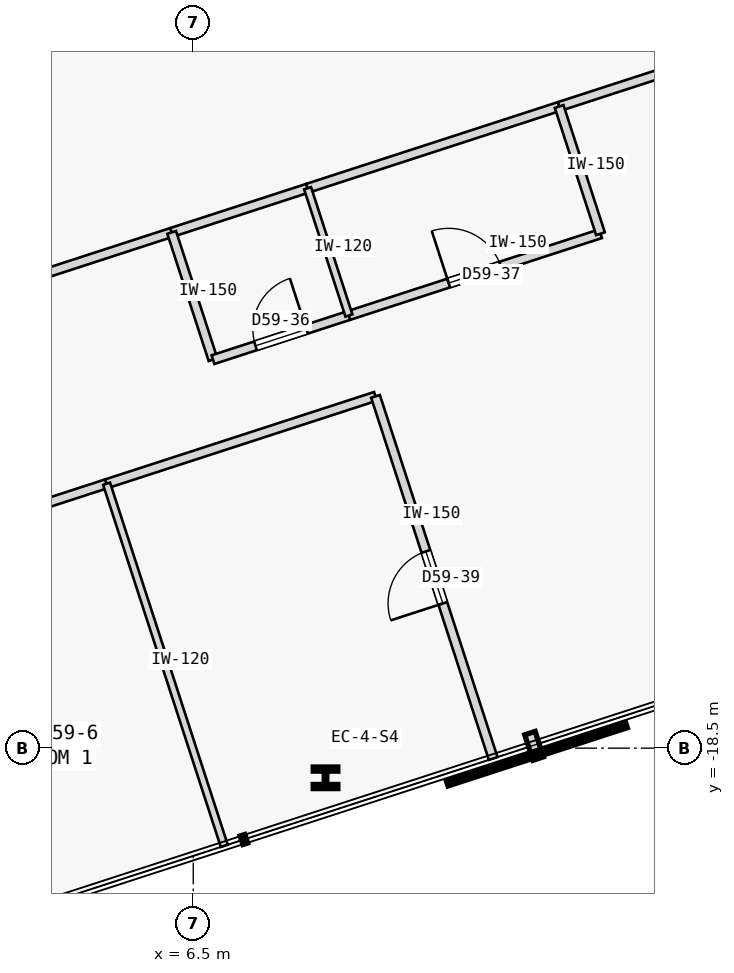
"""IFC4 building model, lengths in metres.
Left out: names, types, materials, properties, quantities, classifications, styles, units other than length and angle.
Written with IfcOpenShell. Run it as: python <this file> out.ifc"""

import sys

from ifc_helpers import new_model, si_unit, direction, frame, frame_2d, origin, origin_2d, place, context, subcontext, project, spatial, rectangle, i_section, extrude, element, fill, save


model = new_model("IFC4")
c1 = context("Model", 3, precision=1e-05, world=origin(), true_north=direction((0.0, 1.0)))
c2 = subcontext(c1, "Body", "Model", "MODEL_VIEW")
j1 = project(units=[si_unit("LENGTHUNIT", "METRE"), si_unit("PLANEANGLEUNIT", "RADIAN")], contexts=[c1])
p1 = place(None, origin())
s1 = spatial("IfcSite", under=j1, at=p1, CompositionType="ELEMENT")
p2 = place(p1, origin())
s2 = spatial("IfcBuilding", under=s1, at=p2, CompositionType="ELEMENT")
p3 = place(p2, frame((0.0, 0.0, 224.3)))
s3 = spatial("IfcBuildingStorey", under=s2, at=p3, CompositionType="ELEMENT", Elevation=224.3)
p4 = place(p3, frame((8.675, -18.988, 0.0), z_axis=(0.0, 0.0, 1.0), x_axis=(1.0, 0.0, 0.0)))
e1 = element("IfcColumn", 1, at=p4, inside=s3, PredefinedType="COLUMN", context=c2, shape_type="SweptSolid", body=[
    extrude(i_section(OverallWidth=0.405, OverallDepth=0.355, WebThickness=0.042, FlangeThickness=0.068, FilletRadius=0.015, at=origin_2d()), origin(), (0.0, 0.0, 1.0), 3.35),
])
p5 = place(p3, frame((-0.555, -12.195, 0.0), z_axis=(0.0, 0.0, 1.0), x_axis=(0.951057495482, 0.309013980732, 0.0)))
e2 = element("IfcWall", 2, at=p5, inside=s3, PredefinedType="PARTITIONING", context=c2, shape_type="SweptSolid", body=[
    extrude(rectangle(XDim=7.045, YDim=0.15, at=frame_2d((3.522, 0.0))), origin(), (0.0, 0.0, 1.0), 3.125),
])
p6 = place(p3, frame((12.517, -7.948, 0.0), z_axis=(0.0, 0.0, 1.0), x_axis=(0.951053764264, 0.309025464128, 0.0)))
e3 = element("IfcWall", 3, at=p6, inside=s3, PredefinedType="PARTITIONING", context=c2, shape_type="SweptSolid", body=[
    extrude(rectangle(XDim=18.399, YDim=0.15, at=frame_2d((9.2, 0.0))), origin(), (0.0, 0.0, 1.0), 3.125),
])
p7 = place(p6, frame((8.725, 0.0, 0.0)))
e4 = element("IfcOpeningElement", 4, at=p7, cuts=e3, PredefinedType="OPENING", context=c2, shape_type="SweptSolid", body=[
    extrude(rectangle(XDim=0.95, YDim=2.15, at=frame_2d((0.475, 1.075))), frame((0.0, 0.085, 0.0), z_axis=(0.0, -1.0, 0.0), x_axis=(1.0, 0.0, 0.0)), (0.0, 0.0, 1.0), 0.17),
])
p8 = place(p3, frame((6.145, -10.018, 0.0), z_axis=(0.0, 0.0, 1.0), x_axis=(0.951035595692, 0.309081373955, 0.0)))
e5 = element("IfcWall", 5, at=p8, inside=s3, PredefinedType="PARTITIONING", context=c2, shape_type="SweptSolid", body=[
    extrude(rectangle(XDim=2.35, YDim=0.15, at=frame_2d((1.175, 0.0))), origin(), (0.0, 0.0, 1.0), 3.125),
])
p9 = place(p3, frame((8.38, -9.292, 0.0), z_axis=(0.0, 0.0, 1.0), x_axis=(0.951074479912, 0.30896170258, 0.0)))
e6 = element("IfcWall", 6, at=p9, inside=s3, PredefinedType="PARTITIONING", context=c2, shape_type="SweptSolid", body=[
    extrude(rectangle(XDim=4.35, YDim=0.15, at=frame_2d((2.175, 0.0))), origin(), (0.0, 0.0, 1.0), 3.125),
])
p10 = place(p3, frame((6.825, -12.111, 0.0), z_axis=(0.0, 0.0, 1.0), x_axis=(-0.308960600764, 0.951074837842, 0.0)))
e7 = element("IfcWall", 7, at=p10, inside=s3, PredefinedType="PARTITIONING", context=c2, shape_type="SweptSolid", body=[
    extrude(rectangle(XDim=2.2, YDim=0.15, at=frame_2d((1.1, 0.0))), origin(), (0.0, 0.0, 1.0), 3.125),
])
p11 = place(p3, frame((6.825, -12.111, 0.0), z_axis=(0.0, 0.0, 1.0), x_axis=(0.951076048914, 0.308956872689, 0.0)))
e8 = element("IfcWall", 8, at=p11, inside=s3, PredefinedType="PARTITIONING", context=c2, shape_type="SweptSolid", body=[
    extrude(rectangle(XDim=2.35, YDim=0.15, at=frame_2d((1.175, 0.0))), origin(), (0.0, 0.0, 1.0), 3.125),
])
p12 = place(p11, frame((0.735, 0.0, 0.0)))
e9 = element("IfcOpeningElement", 9, at=p12, cuts=e8, PredefinedType="OPENING", context=c2, shape_type="SweptSolid", body=[
    extrude(rectangle(XDim=0.88, YDim=2.15, at=frame_2d((0.44, 1.075))), frame((0.0, 0.085, 0.0), z_axis=(0.0, -1.0, 0.0), x_axis=(1.0, 0.0, 0.0)), (0.0, 0.0, 1.0), 0.17),
])
p13 = place(p3, frame((9.06, -11.385, 0.0), z_axis=(0.0, 0.0, 1.0), x_axis=(0.951057987102, 0.309012467661, 0.0)))
e10 = element("IfcWall", 10, at=p13, inside=s3, PredefinedType="PARTITIONING", context=c2, shape_type="SweptSolid", body=[
    extrude(rectangle(XDim=4.35, YDim=0.15, at=frame_2d((2.175, 0.0))), origin(), (0.0, 0.0, 1.0), 3.125),
])
p14 = place(p13, frame((1.725, 0.0, 0.0)))
e11 = element("IfcOpeningElement", 11, at=p14, cuts=e10, PredefinedType="OPENING", context=c2, shape_type="SweptSolid", body=[
    extrude(rectangle(XDim=0.9, YDim=2.15, at=frame_2d((0.45, 1.075))), frame((0.0, 0.085, 0.0), z_axis=(0.0, -1.0, 0.0), x_axis=(1.0, 0.0, 0.0)), (0.0, 0.0, 1.0), 0.17),
])
p15 = place(p3, frame((13.197, -10.04, 0.0), z_axis=(0.0, 0.0, 1.0), x_axis=(-0.309060979314, 0.951042223598, 0.0)))
e12 = element("IfcWall", 12, at=p15, inside=s3, PredefinedType="PARTITIONING", context=c2, shape_type="SweptSolid", body=[
    extrude(rectangle(XDim=2.2, YDim=0.15, at=frame_2d((1.1, 0.0))), origin(), (0.0, 0.0, 1.0), 3.125),
])
p16 = place(p3, frame((0.652, -15.588, 0.0), z_axis=(0.0, 0.0, 1.0), x_axis=(0.951065702951, 0.308988719326, 0.0)))
e13 = element("IfcWall", 13, at=p16, inside=s3, PredefinedType="PARTITIONING", context=c2, shape_type="SweptSolid", body=[
    extrude(rectangle(XDim=4.65, YDim=0.15, at=frame_2d((2.325, 0.0))), origin(), (0.0, 0.0, 1.0), 3.125),
])
p17 = place(p16, frame((1.875, 0.0, 0.0)))
e14 = element("IfcOpeningElement", 14, at=p17, cuts=e13, PredefinedType="OPENING", context=c2, shape_type="SweptSolid", body=[
    extrude(rectangle(XDim=0.9, YDim=2.15, at=frame_2d((0.45, 1.075))), frame((0.0, 0.085, 0.0), z_axis=(0.0, -1.0, 0.0), x_axis=(1.0, 0.0, 0.0)), (0.0, 0.0, 1.0), 0.17),
])
p18 = place(p3, frame((5.075, -14.151, 0.0), z_axis=(0.0, 0.0, 1.0), x_axis=(0.951055286502, 0.309020779263, 0.0)))
e15 = element("IfcWall", 15, at=p18, inside=s3, PredefinedType="PARTITIONING", context=c2, shape_type="SweptSolid", body=[
    extrude(rectangle(XDim=4.65, YDim=0.15, at=frame_2d((2.325, 0.0))), origin(), (0.0, 0.0, 1.0), 3.125),
])
p19 = place(p3, frame((11.432, -18.67, 0.0), z_axis=(0.0, 0.0, 1.0), x_axis=(-0.309013782848, 0.951057559777, 0.0)))
e16 = element("IfcWall", 16, at=p19, inside=s3, PredefinedType="PARTITIONING", context=c2, shape_type="SweptSolid", body=[
    extrude(rectangle(XDim=6.262, YDim=0.15, at=frame_2d((3.131, 0.0))), origin(), (0.0, 0.0, 1.0), 3.125),
])
p20 = place(p19, frame((2.681, 0.0, 0.0)))
e17 = element("IfcOpeningElement", 17, at=p20, cuts=e16, PredefinedType="OPENING", context=c2, shape_type="SweptSolid", body=[
    extrude(rectangle(XDim=0.9, YDim=2.15, at=frame_2d((0.45, 1.075))), frame((0.0, 0.085, 0.0), z_axis=(0.0, -1.0, 0.0), x_axis=(1.0, 0.0, 0.0)), (0.0, 0.0, 1.0), 0.17),
])
p21 = place(p3, frame((9.06, -11.385, 0.0), z_axis=(0.0, 0.0, 1.0), x_axis=(-0.309028364152, 0.951052821956, 0.0)))
e18 = element("IfcWall", 18, at=p21, inside=s3, PredefinedType="PARTITIONING", context=c2, shape_type="SweptSolid", body=[
    extrude(rectangle(XDim=2.2, YDim=0.12, at=frame_2d((1.1, 0.0))), origin(), (0.0, 0.0, 1.0), 3.125),
])
p22 = place(p3, frame((7.01, -20.107, 0.0), z_axis=(0.0, 0.0, 1.0), x_axis=(-0.30902524124, 0.951053836687, 0.0)))
e19 = element("IfcWall", 19, at=p22, inside=s3, PredefinedType="PARTITIONING", context=c2, shape_type="SweptSolid", body=[
    extrude(rectangle(XDim=6.262, YDim=0.12, at=frame_2d((3.131, 0.0))), origin(), (0.0, 0.0, 1.0), 3.125),
])
p23 = place(p12, origin())
e20 = element("IfcDoor", 20, at=p23, inside=s3, OperationType="SINGLE_SWING_RIGHT", PredefinedType="DOOR", context=c2, shape_type="SweptSolid", body=[
    extrude(rectangle(XDim=0.88, YDim=2.15, at=frame_2d((0.44, 1.075))), frame((0.0, 0.025, 0.0), z_axis=(0.0, -1.0, 0.0), x_axis=(1.0, 0.0, 0.0)), (0.0, 0.0, 1.0), 0.05),
])
fill(e9, e20)
p24 = place(p14, origin())
e21 = element("IfcDoor", 21, at=p24, inside=s3, OperationType="SINGLE_SWING_LEFT", PredefinedType="DOOR", context=c2, shape_type="SweptSolid", body=[
    extrude(rectangle(XDim=0.9, YDim=2.15, at=frame_2d((0.45, 1.075))), frame((0.0, 0.025, 0.0), z_axis=(0.0, -1.0, 0.0), x_axis=(1.0, 0.0, 0.0)), (0.0, 0.0, 1.0), 0.05),
])
fill(e11, e21)
p25 = place(p20, origin())
e22 = element("IfcDoor", 22, at=p25, inside=s3, OperationType="SINGLE_SWING_LEFT", PredefinedType="DOOR", context=c2, shape_type="SweptSolid", body=[
    extrude(rectangle(XDim=0.9, YDim=2.15, at=frame_2d((0.45, 1.075))), frame((0.0, 0.025, 0.0), z_axis=(0.0, -1.0, 0.0), x_axis=(1.0, 0.0, 0.0)), (0.0, 0.0, 1.0), 0.05),
])
fill(e17, e22)
save(model, sys.argv[1])
